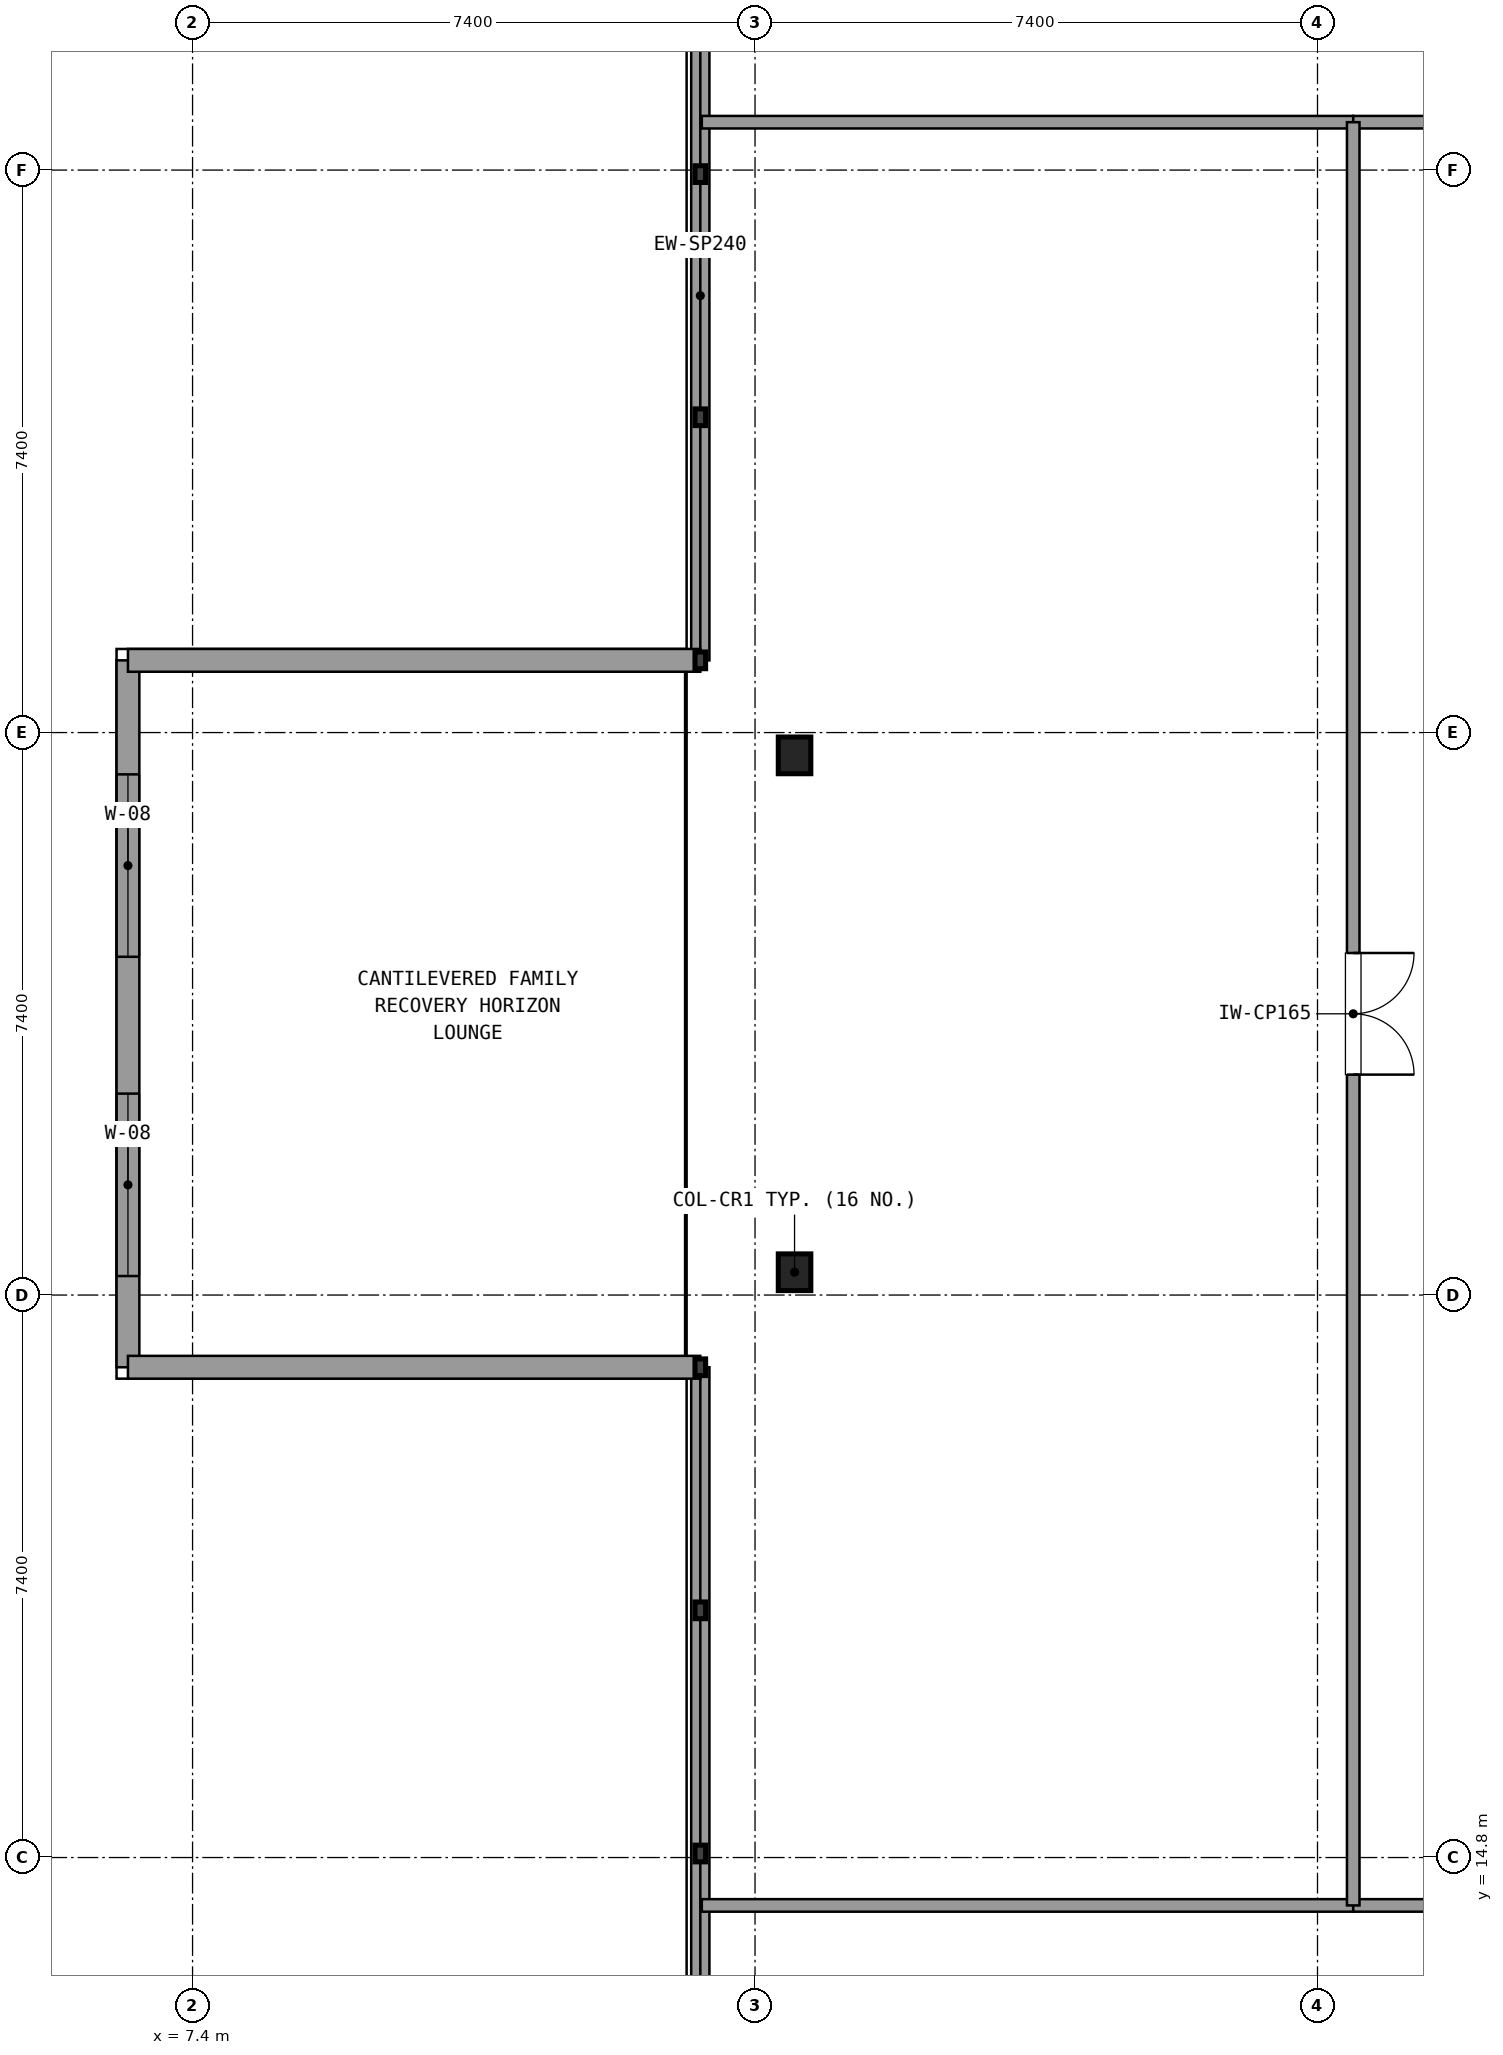
"""IFC4 building model, lengths in metres.
Left out: names, types, materials, properties, quantities, classifications, styles, units other than length and angle.
Written with IfcOpenShell. Run it as: python <this file> out.ifc"""

import sys

from ifc_helpers import new_model, si_unit, direction, frame, frame_2d, origin, origin_2d, place, context, subcontext, project, spatial, rectangle, i_section, extrude, element, fill, save


model = new_model("IFC4")
c1 = context("Model", 3, precision=1e-05, world=origin(), true_north=direction((0.0, 1.0)))
c2 = subcontext(c1, "Body", "Model", "MODEL_VIEW")
j1 = project(units=[si_unit("LENGTHUNIT", "METRE"), si_unit("PLANEANGLEUNIT", "RADIAN")], contexts=[c1])
p1 = place(None, origin())
s1 = spatial("IfcSite", under=j1, at=p1, CompositionType="ELEMENT")
p2 = place(p1, origin())
s2 = spatial("IfcBuilding", under=s1, at=p2, CompositionType="ELEMENT")
p3 = place(p2, frame((0.0, 0.0, 290.34)))
s3 = spatial("IfcBuildingStorey", under=s2, at=p3, CompositionType="ELEMENT", Elevation=290.34)
for number, where, z_axis, x_axis in (
    (1, (15.32, 22.5, 0.0), (0.0, 0.0, 1.0), (1.0, 0.0, 0.0)),
    (2, (15.32, 29.3, 0.0), (0.0, 0.0, 1.0), (1.0, 0.0, 0.0)),
):
    element("IfcColumn", number, at=place(p3, frame(where, z_axis=z_axis, x_axis=x_axis)), inside=s3, PredefinedType="COLUMN", context=c2, shape_type="SweptSolid", body=[
        extrude(i_section(OverallWidth=0.428, OverallDepth=0.483, WebThickness=0.042, FlangeThickness=0.068, at=origin_2d()), origin(), (0.0, 0.0, 1.0), 4.32),
    ])
for number, where, z_axis, x_axis in (
    (3, (14.08, 40.145, 0.0), (0.0, 0.0, 1.0), (0.0, -1.0, 0.0)),
    (4, (14.08, 21.25, 0.0), (0.0, 0.0, 1.0), (0.0, -1.0, 0.0)),
):
    element("IfcWall", number, at=place(p3, frame(where, z_axis=z_axis, x_axis=x_axis)), inside=s3, PredefinedType="SOLIDWALL", context=c2, shape_type="SweptSolid", body=[
        extrude(rectangle(XDim=9.595, YDim=0.24, at=frame_2d((4.797, 0.0))), origin(), (0.0, 0.0, 1.0), 0.85),
    ])
p4 = place(p3, frame((6.55, 21.25, 0.0), z_axis=(0.0, 0.0, 1.0), x_axis=(0.0, 1.0, 0.0)))
e5 = element("IfcWall", 5, at=p4, inside=s3, PredefinedType="SOLIDWALL", context=c2, shape_type="SweptSolid", body=[
    extrude(rectangle(XDim=9.3, YDim=0.3, at=frame_2d((4.65, 0.0))), origin(), (0.0, 0.0, 1.0), 3.46),
])
p5 = place(p4, frame((1.2, 0.0, 0.75)))
e6 = element("IfcOpeningElement", 6, at=p5, cuts=e5, PredefinedType="OPENING", context=c2, shape_type="SweptSolid", body=[
    extrude(rectangle(XDim=2.4, YDim=1.8, at=frame_2d((1.2, 0.9))), frame((0.0, 0.16, 0.0), z_axis=(0.0, -1.0, 0.0), x_axis=(1.0, 0.0, 0.0)), (0.0, 0.0, 1.0), 0.32),
])
p6 = place(p4, frame((5.4, 0.0, 0.75)))
e7 = element("IfcOpeningElement", 7, at=p6, cuts=e5, PredefinedType="OPENING", context=c2, shape_type="SweptSolid", body=[
    extrude(rectangle(XDim=2.4, YDim=1.8, at=frame_2d((1.2, 0.9))), frame((0.0, 0.16, 0.0), z_axis=(0.0, -1.0, 0.0), x_axis=(1.0, 0.0, 0.0)), (0.0, 0.0, 1.0), 0.32),
])
for number, where, z_axis, x_axis in (
    (8, (6.55, 21.25, 0.0), (0.0, 0.0, 1.0), (1.0, 0.0, 0.0)),
    (9, (6.55, 30.55, 0.0), (0.0, 0.0, 1.0), (1.0, 0.0, 0.0)),
):
    element("IfcWall", number, at=place(p3, frame(where, z_axis=z_axis, x_axis=x_axis)), inside=s3, PredefinedType="SOLIDWALL", context=c2, shape_type="SweptSolid", body=[
        extrude(rectangle(XDim=7.53, YDim=0.3, at=frame_2d((3.765, 0.0))), origin(), (0.0, 0.0, 1.0), 3.46),
    ])
for number, where, z_axis, x_axis in (
    (10, (14.1, 37.63, 0.0), (0.0, 0.0, 1.0), (1.0, 0.0, 0.0)),
    (11, (14.1, 14.17, 0.0), (0.0, 0.0, 1.0), (1.0, 0.0, 0.0)),
):
    element("IfcWall", number, at=place(p3, frame(where, z_axis=z_axis, x_axis=x_axis)), inside=s3, PredefinedType="PARTITIONING", context=c2, shape_type="SweptSolid", body=[
        extrude(rectangle(XDim=8.57, YDim=0.165, at=frame_2d((4.285, 0.0))), origin(), (0.0, 0.0, 1.0), 2.93),
    ])
p7 = place(p3, frame((22.67, 37.63, 0.0), z_axis=(0.0, 0.0, 1.0), x_axis=(1.0, 0.0, 0.0)))
e12 = element("IfcWall", 12, at=p7, inside=s3, PredefinedType="PARTITIONING", context=c2, shape_type="SweptSolid", body=[
    extrude(rectangle(XDim=19.581, YDim=0.165, at=frame_2d((9.791, 0.0))), origin(), (0.0, 0.0, 1.0), 2.93),
])
p8 = place(p7, frame((8.99, 0.0, 0.0)))
e13 = element("IfcOpeningElement", 13, at=p8, cuts=e12, PredefinedType="OPENING", context=c2, shape_type="SweptSolid", body=[
    extrude(rectangle(XDim=1.6, YDim=2.2, at=frame_2d((0.8, 1.1))), frame((0.0, 0.093, 0.0), z_axis=(0.0, -1.0, 0.0), x_axis=(1.0, 0.0, 0.0)), (0.0, 0.0, 1.0), 0.185),
])
p9 = place(p3, frame((22.67, 14.17, 0.0), z_axis=(0.0, 0.0, 1.0), x_axis=(1.0, 0.0, 0.0)))
e14 = element("IfcWall", 14, at=p9, inside=s3, PredefinedType="PARTITIONING", context=c2, shape_type="SweptSolid", body=[
    extrude(rectangle(XDim=8.204, YDim=0.165, at=frame_2d((4.102, 0.0))), origin(), (0.0, 0.0, 1.0), 2.93),
])
p10 = place(p9, frame((3.302, 0.0, 0.0)))
e15 = element("IfcOpeningElement", 15, at=p10, cuts=e14, PredefinedType="OPENING", context=c2, shape_type="SweptSolid", body=[
    extrude(rectangle(XDim=1.6, YDim=2.2, at=frame_2d((0.8, 1.1))), frame((0.0, 0.093, 0.0), z_axis=(0.0, -1.0, 0.0), x_axis=(1.0, 0.0, 0.0)), (0.0, 0.0, 1.0), 0.185),
])
p11 = place(p3, frame((22.67, 14.17, 0.0), z_axis=(0.0, 0.0, 1.0), x_axis=(0.0, 1.0, 0.0)))
e16 = element("IfcWall", 16, at=p11, inside=s3, PredefinedType="PARTITIONING", context=c2, shape_type="SweptSolid", body=[
    extrude(rectangle(XDim=23.46, YDim=0.165, at=frame_2d((11.73, 0.0))), origin(), (0.0, 0.0, 1.0), 2.93),
])
p12 = place(p11, frame((10.93, 0.0, 0.0)))
e17 = element("IfcOpeningElement", 17, at=p12, cuts=e16, PredefinedType="OPENING", context=c2, shape_type="SweptSolid", body=[
    extrude(rectangle(XDim=1.6, YDim=2.2, at=frame_2d((0.8, 1.1))), frame((0.0, 0.093, 0.0), z_axis=(0.0, -1.0, 0.0), x_axis=(1.0, 0.0, 0.0)), (0.0, 0.0, 1.0), 0.185),
])
p13 = place(p5, origin())
e18 = element("IfcWindow", 18, at=p13, inside=s3, PartitioningType="SINGLE_PANEL", PredefinedType="WINDOW", context=c2, shape_type="SweptSolid", body=[
    extrude(rectangle(XDim=2.4, YDim=1.8, at=frame_2d((1.2, 0.9))), frame((0.0, 0.03, 0.0), z_axis=(0.0, -1.0, 0.0), x_axis=(1.0, 0.0, 0.0)), (0.0, 0.0, 1.0), 0.06),
])
fill(e6, e18)
p14 = place(p6, origin())
e19 = element("IfcWindow", 19, at=p14, inside=s3, PartitioningType="SINGLE_PANEL", PredefinedType="WINDOW", context=c2, shape_type="SweptSolid", body=[
    extrude(rectangle(XDim=2.4, YDim=1.8, at=frame_2d((1.2, 0.9))), frame((0.0, 0.03, 0.0), z_axis=(0.0, -1.0, 0.0), x_axis=(1.0, 0.0, 0.0)), (0.0, 0.0, 1.0), 0.06),
])
fill(e7, e19)
p15 = place(p12, frame((1.6, 0.0, 0.0), z_axis=(0.0, 0.0, 1.0), x_axis=(-1.0, 0.0, 0.0)))
e20 = element("IfcDoor", 20, at=p15, inside=s3, OperationType="DOUBLE_DOOR_SINGLE_SWING", PredefinedType="DOOR", context=c2, shape_type="SweptSolid", body=[
    extrude(rectangle(XDim=1.6, YDim=2.2, at=frame_2d((0.8, 1.1))), frame((0.0, 0.025, 0.0), z_axis=(0.0, -1.0, 0.0), x_axis=(1.0, 0.0, 0.0)), (0.0, 0.0, 1.0), 0.05),
])
fill(e17, e20)
save(model, sys.argv[1])
